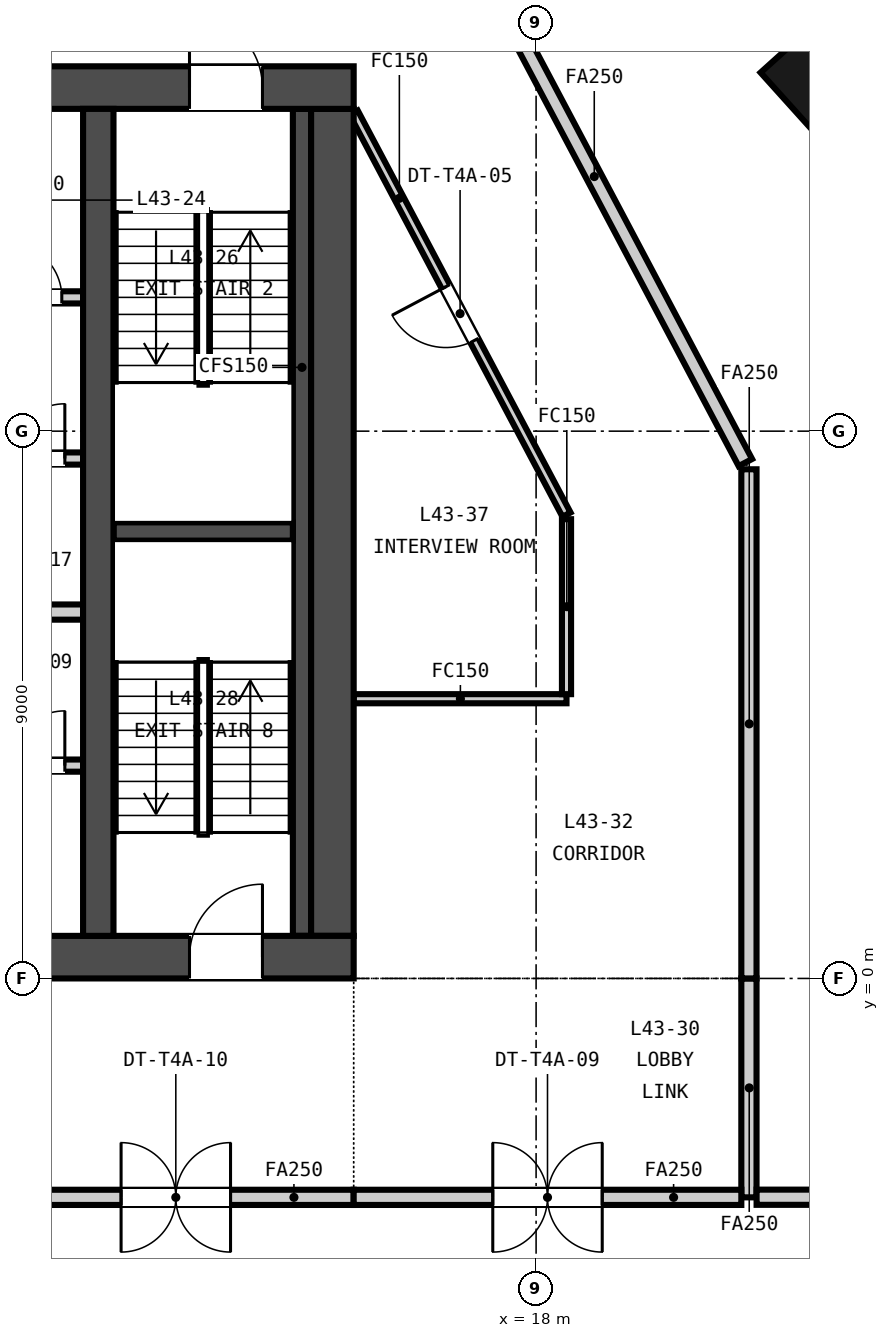
"""IFC4 building model, lengths in metres.
Left out: names, types, materials, properties, quantities, classifications, styles, units other than length and angle.
Written with IfcOpenShell. Run it as: python <this file> out.ifc"""

import sys

from ifc_helpers import new_model, si_unit, direction, frame, frame_2d, origin, origin_2d, place, context, subcontext, project, spatial, rectangle, extrude, element, fill, save


model = new_model("IFC4")
c1 = context("Model", 3, precision=1e-05, world=origin(), true_north=direction((0.0, 1.0)))
c2 = subcontext(c1, "Body", "Model", "MODEL_VIEW")
j1 = project(units=[si_unit("LENGTHUNIT", "METRE"), si_unit("PLANEANGLEUNIT", "RADIAN")], contexts=[c1])
p1 = place(None, origin())
s1 = spatial("IfcSite", under=j1, at=p1, CompositionType="ELEMENT")
p2 = place(p1, origin())
s2 = spatial("IfcBuilding", under=s1, at=p2, CompositionType="ELEMENT")
p3 = place(p2, frame((0.0, 0.0, 174.45)))
s3 = spatial("IfcBuildingStorey", under=s2, at=p3, CompositionType="ELEMENT", Elevation=174.45)
p4 = place(p3, frame((-15.0, 0.35, -0.15), z_axis=(0.0, 0.0, 1.0), x_axis=(1.0, 0.0, 0.0)))
e1 = element("IfcWall", 1, at=p4, inside=s3, PredefinedType="SOLIDWALL", context=c2, shape_type="SweptSolid", body=[
    extrude(rectangle(XDim=30.0, YDim=0.7, at=frame_2d((15.0, 0.0))), origin(), (0.0, 0.0, 1.0), 3.65),
])
p5 = place(p4, frame((5.8, 0.0, 0.15)))
e2 = element("IfcOpeningElement", 2, at=p5, cuts=e1, PredefinedType="OPENING", context=c2, shape_type="SweptSolid", body=[
    extrude(rectangle(XDim=2.4, YDim=2.4, at=frame_2d((1.2, 1.2))), frame((0.0, 0.36, 0.0), z_axis=(0.0, -1.0, 0.0), x_axis=(1.0, 0.0, 0.0)), (0.0, 0.0, 1.0), 0.72),
])
p6 = place(p4, frame((13.8, 0.0, 0.15)))
e3 = element("IfcOpeningElement", 3, at=p6, cuts=e1, PredefinedType="OPENING", context=c2, shape_type="SweptSolid", body=[
    extrude(rectangle(XDim=2.4, YDim=2.4, at=frame_2d((1.2, 1.2))), frame((0.0, 0.36, 0.0), z_axis=(0.0, -1.0, 0.0), x_axis=(1.0, 0.0, 0.0)), (0.0, 0.0, 1.0), 0.72),
])
p7 = place(p4, frame((21.8, 0.0, 0.15)))
e4 = element("IfcOpeningElement", 4, at=p7, cuts=e1, PredefinedType="OPENING", context=c2, shape_type="SweptSolid", body=[
    extrude(rectangle(XDim=2.4, YDim=2.4, at=frame_2d((1.2, 1.2))), frame((0.0, 0.36, 0.0), z_axis=(0.0, -1.0, 0.0), x_axis=(1.0, 0.0, 0.0)), (0.0, 0.0, 1.0), 0.72),
])
p8 = place(p4, frame((1.5, 0.0, 0.15)))
e5 = element("IfcOpeningElement", 5, at=p8, cuts=e1, PredefinedType="OPENING", context=c2, shape_type="SweptSolid", body=[
    extrude(rectangle(XDim=1.2, YDim=2.1, at=frame_2d((0.6, 1.05))), frame((0.0, 0.36, 0.0), z_axis=(0.0, -1.0, 0.0), x_axis=(1.0, 0.0, 0.0)), (0.0, 0.0, 1.0), 0.72),
])
p9 = place(p4, frame((27.3, 0.0, 0.15)))
e6 = element("IfcOpeningElement", 6, at=p9, cuts=e1, PredefinedType="OPENING", context=c2, shape_type="SweptSolid", body=[
    extrude(rectangle(XDim=1.2, YDim=2.1, at=frame_2d((0.6, 1.05))), frame((0.0, 0.36, 0.0), z_axis=(0.0, -1.0, 0.0), x_axis=(1.0, 0.0, 0.0)), (0.0, 0.0, 1.0), 0.72),
])
p10 = place(p3, frame((-15.0, 14.65, -0.15), z_axis=(0.0, 0.0, 1.0), x_axis=(1.0, 0.0, 0.0)))
e7 = element("IfcWall", 7, at=p10, inside=s3, PredefinedType="SOLIDWALL", context=c2, shape_type="SweptSolid", body=[
    extrude(rectangle(XDim=30.0, YDim=0.7, at=frame_2d((15.0, 0.0))), origin(), (0.0, 0.0, 1.0), 3.65),
])
p11 = place(p10, frame((9.25, 0.0, 0.15)))
e8 = element("IfcOpeningElement", 8, at=p11, cuts=e7, PredefinedType="OPENING", context=c2, shape_type="SweptSolid", body=[
    extrude(rectangle(XDim=1.5, YDim=2.1, at=frame_2d((0.75, 1.05))), frame((0.0, 0.36, 0.0), z_axis=(0.0, -1.0, 0.0), x_axis=(1.0, 0.0, 0.0)), (0.0, 0.0, 1.0), 0.72),
])
p12 = place(p10, frame((19.4, 0.0, 0.15)))
e9 = element("IfcOpeningElement", 9, at=p12, cuts=e7, PredefinedType="OPENING", context=c2, shape_type="SweptSolid", body=[
    extrude(rectangle(XDim=1.5, YDim=2.1, at=frame_2d((0.75, 1.05))), frame((0.0, 0.36, 0.0), z_axis=(0.0, -1.0, 0.0), x_axis=(1.0, 0.0, 0.0)), (0.0, 0.0, 1.0), 0.72),
])
p13 = place(p10, frame((1.5, 0.0, 0.15)))
e10 = element("IfcOpeningElement", 10, at=p13, cuts=e7, PredefinedType="OPENING", context=c2, shape_type="SweptSolid", body=[
    extrude(rectangle(XDim=1.2, YDim=2.1, at=frame_2d((0.6, 1.05))), frame((0.0, 0.36, 0.0), z_axis=(0.0, -1.0, 0.0), x_axis=(1.0, 0.0, 0.0)), (0.0, 0.0, 1.0), 0.72),
])
p14 = place(p10, frame((27.3, 0.0, 0.15)))
e11 = element("IfcOpeningElement", 11, at=p14, cuts=e7, PredefinedType="OPENING", context=c2, shape_type="SweptSolid", body=[
    extrude(rectangle(XDim=1.2, YDim=2.1, at=frame_2d((0.6, 1.05))), frame((0.0, 0.36, 0.0), z_axis=(0.0, -1.0, 0.0), x_axis=(1.0, 0.0, 0.0)), (0.0, 0.0, 1.0), 0.72),
])
p15 = place(p3, frame((14.65, 0.7, -0.15), z_axis=(0.0, 0.0, 1.0), x_axis=(0.0, 1.0, 0.0)))
e12 = element("IfcWall", 12, at=p15, inside=s3, PredefinedType="SOLIDWALL", context=c2, shape_type="SweptSolid", body=[
    extrude(rectangle(XDim=13.6, YDim=0.7, at=frame_2d((6.8, 0.0))), origin(), (0.0, 0.0, 1.0), 3.65),
])
p16 = place(p3, frame((10.8, 0.7, -0.15), z_axis=(0.0, 0.0, 1.0), x_axis=(0.0, 1.0, 0.0)))
e13 = element("IfcWall", 13, at=p16, inside=s3, PredefinedType="SOLIDWALL", context=c2, shape_type="SweptSolid", body=[
    extrude(rectangle(XDim=13.6, YDim=0.5, at=frame_2d((6.8, 0.0))), origin(), (0.0, 0.0, 1.0), 3.65),
])
p17 = place(p3, frame((22.61, 14.849, -0.15), z_axis=(0.0, 0.0, 1.0), x_axis=(-0.669130606359, 0.743144825477, 0.0)))
e14 = element("IfcColumn", 14, at=p17, inside=s3, PredefinedType="COLUMN", context=c2, shape_type="SweptSolid", body=[
    extrude(rectangle(XDim=1.3, YDim=1.3, at=origin_2d()), origin(), (0.0, 0.0, 1.0), 3.65),
])
p18 = place(p3, frame((-10.55, 3.5, 0.0), z_axis=(0.0, 0.0, 1.0), x_axis=(1.0, 0.0, 0.0)))
e15 = element("IfcWall", 15, at=p18, inside=s3, PredefinedType="PARTITIONING", context=c2, shape_type="SweptSolid", body=[
    extrude(rectangle(XDim=21.1, YDim=0.2, at=frame_2d((10.55, 0.0))), origin(), (0.0, 0.0, 1.0), 3.5),
])
p19 = place(p18, frame((1.113, 0.0, 0.0)))
e16 = element("IfcOpeningElement", 16, at=p19, cuts=e15, PredefinedType="OPENING", context=c2, shape_type="SweptSolid", body=[
    extrude(rectangle(XDim=1.0, YDim=2.1, at=frame_2d((0.5, 1.05))), frame((0.0, 0.11, 0.0), z_axis=(0.0, -1.0, 0.0), x_axis=(1.0, 0.0, 0.0)), (0.0, 0.0, 1.0), 0.22),
])
p20 = place(p18, frame((5.15, 0.0, 0.0)))
e17 = element("IfcOpeningElement", 17, at=p20, cuts=e15, PredefinedType="OPENING", context=c2, shape_type="SweptSolid", body=[
    extrude(rectangle(XDim=1.0, YDim=2.1, at=frame_2d((0.5, 1.05))), frame((0.0, 0.11, 0.0), z_axis=(0.0, -1.0, 0.0), x_axis=(1.0, 0.0, 0.0)), (0.0, 0.0, 1.0), 0.22),
])
p21 = place(p18, frame((9.85, 0.0, 0.0)))
e18 = element("IfcOpeningElement", 18, at=p21, cuts=e15, PredefinedType="OPENING", context=c2, shape_type="SweptSolid", body=[
    extrude(rectangle(XDim=1.0, YDim=2.1, at=frame_2d((0.5, 1.05))), frame((0.0, 0.11, 0.0), z_axis=(0.0, -1.0, 0.0), x_axis=(1.0, 0.0, 0.0)), (0.0, 0.0, 1.0), 0.22),
])
p22 = place(p18, frame((13.4, 0.0, 0.0)))
e19 = element("IfcOpeningElement", 19, at=p22, cuts=e15, PredefinedType="OPENING", context=c2, shape_type="SweptSolid", body=[
    extrude(rectangle(XDim=1.0, YDim=2.1, at=frame_2d((0.5, 1.05))), frame((0.0, 0.11, 0.0), z_axis=(0.0, -1.0, 0.0), x_axis=(1.0, 0.0, 0.0)), (0.0, 0.0, 1.0), 0.22),
])
p23 = place(p18, frame((16.762, 0.0, 0.0)))
e20 = element("IfcOpeningElement", 20, at=p23, cuts=e15, PredefinedType="OPENING", context=c2, shape_type="SweptSolid", body=[
    extrude(rectangle(XDim=1.0, YDim=2.1, at=frame_2d((0.5, 1.05))), frame((0.0, 0.11, 0.0), z_axis=(0.0, -1.0, 0.0), x_axis=(1.0, 0.0, 0.0)), (0.0, 0.0, 1.0), 0.22),
])
p24 = place(p18, frame((19.9, 0.0, 0.0)))
e21 = element("IfcOpeningElement", 21, at=p24, cuts=e15, PredefinedType="OPENING", context=c2, shape_type="SweptSolid", body=[
    extrude(rectangle(XDim=0.9, YDim=2.1, at=frame_2d((0.45, 1.05))), frame((0.0, 0.11, 0.0), z_axis=(0.0, -1.0, 0.0), x_axis=(1.0, 0.0, 0.0)), (0.0, 0.0, 1.0), 0.22),
])
p25 = place(p3, frame((-10.55, 6.025, 0.0), z_axis=(0.0, 0.0, 1.0), x_axis=(1.0, 0.0, 0.0)))
e22 = element("IfcWall", 22, at=p25, inside=s3, PredefinedType="PARTITIONING", context=c2, shape_type="SweptSolid", body=[
    extrude(rectangle(XDim=21.1, YDim=0.25, at=frame_2d((10.55, 0.0))), origin(), (0.0, 0.0, 1.0), 3.5),
])
p26 = place(p3, frame((-10.55, 8.55, 0.0), z_axis=(0.0, 0.0, 1.0), x_axis=(1.0, 0.0, 0.0)))
e23 = element("IfcWall", 23, at=p26, inside=s3, PredefinedType="PARTITIONING", context=c2, shape_type="SweptSolid", body=[
    extrude(rectangle(XDim=21.1, YDim=0.2, at=frame_2d((10.55, 0.0))), origin(), (0.0, 0.0, 1.0), 3.5),
])
p27 = place(p26, frame((0.675, 0.0, 0.0)))
e24 = element("IfcOpeningElement", 24, at=p27, cuts=e23, PredefinedType="OPENING", context=c2, shape_type="SweptSolid", body=[
    extrude(rectangle(XDim=1.2, YDim=2.1, at=frame_2d((0.6, 1.05))), frame((0.0, 0.11, 0.0), z_axis=(0.0, -1.0, 0.0), x_axis=(1.0, 0.0, 0.0)), (0.0, 0.0, 1.0), 0.22),
])
p28 = place(p26, frame((3.475, 0.0, 0.0)))
e25 = element("IfcOpeningElement", 25, at=p28, cuts=e23, PredefinedType="OPENING", context=c2, shape_type="SweptSolid", body=[
    extrude(rectangle(XDim=1.2, YDim=2.1, at=frame_2d((0.6, 1.05))), frame((0.0, 0.11, 0.0), z_axis=(0.0, -1.0, 0.0), x_axis=(1.0, 0.0, 0.0)), (0.0, 0.0, 1.0), 0.22),
])
p29 = place(p26, frame((6.275, 0.0, 0.0)))
e26 = element("IfcOpeningElement", 26, at=p29, cuts=e23, PredefinedType="OPENING", context=c2, shape_type="SweptSolid", body=[
    extrude(rectangle(XDim=1.2, YDim=2.1, at=frame_2d((0.6, 1.05))), frame((0.0, 0.11, 0.0), z_axis=(0.0, -1.0, 0.0), x_axis=(1.0, 0.0, 0.0)), (0.0, 0.0, 1.0), 0.22),
])
p30 = place(p26, frame((9.075, 0.0, 0.0)))
e27 = element("IfcOpeningElement", 27, at=p30, cuts=e23, PredefinedType="OPENING", context=c2, shape_type="SweptSolid", body=[
    extrude(rectangle(XDim=1.2, YDim=2.1, at=frame_2d((0.6, 1.05))), frame((0.0, 0.11, 0.0), z_axis=(0.0, -1.0, 0.0), x_axis=(1.0, 0.0, 0.0)), (0.0, 0.0, 1.0), 0.22),
])
p31 = place(p26, frame((11.875, 0.0, 0.0)))
e28 = element("IfcOpeningElement", 28, at=p31, cuts=e23, PredefinedType="OPENING", context=c2, shape_type="SweptSolid", body=[
    extrude(rectangle(XDim=1.2, YDim=2.1, at=frame_2d((0.6, 1.05))), frame((0.0, 0.11, 0.0), z_axis=(0.0, -1.0, 0.0), x_axis=(1.0, 0.0, 0.0)), (0.0, 0.0, 1.0), 0.22),
])
p32 = place(p26, frame((14.675, 0.0, 0.0)))
e29 = element("IfcOpeningElement", 29, at=p32, cuts=e23, PredefinedType="OPENING", context=c2, shape_type="SweptSolid", body=[
    extrude(rectangle(XDim=1.2, YDim=2.1, at=frame_2d((0.6, 1.05))), frame((0.0, 0.11, 0.0), z_axis=(0.0, -1.0, 0.0), x_axis=(1.0, 0.0, 0.0)), (0.0, 0.0, 1.0), 0.22),
])
p33 = place(p26, frame((17.475, 0.0, 0.0)))
e30 = element("IfcOpeningElement", 30, at=p33, cuts=e23, PredefinedType="OPENING", context=c2, shape_type="SweptSolid", body=[
    extrude(rectangle(XDim=1.2, YDim=2.1, at=frame_2d((0.6, 1.05))), frame((0.0, 0.11, 0.0), z_axis=(0.0, -1.0, 0.0), x_axis=(1.0, 0.0, 0.0)), (0.0, 0.0, 1.0), 0.22),
])
p34 = place(p26, frame((19.9, 0.0, 0.0)))
e31 = element("IfcOpeningElement", 31, at=p34, cuts=e23, PredefinedType="OPENING", context=c2, shape_type="SweptSolid", body=[
    extrude(rectangle(XDim=0.9, YDim=2.1, at=frame_2d((0.45, 1.05))), frame((0.0, 0.11, 0.0), z_axis=(0.0, -1.0, 0.0), x_axis=(1.0, 0.0, 0.0)), (0.0, 0.0, 1.0), 0.22),
])
p35 = place(p3, frame((5.9, 11.2, 0.0), z_axis=(0.0, 0.0, 1.0), x_axis=(1.0, 0.0, 0.0)))
e32 = element("IfcWall", 32, at=p35, inside=s3, PredefinedType="PARTITIONING", context=c2, shape_type="SweptSolid", body=[
    extrude(rectangle(XDim=4.65, YDim=0.2, at=frame_2d((2.325, 0.0))), origin(), (0.0, 0.0, 1.0), 3.5),
])
p36 = place(p35, frame((3.4, 0.0, 0.0)))
e33 = element("IfcOpeningElement", 33, at=p36, cuts=e32, PredefinedType="OPENING", context=c2, shape_type="SweptSolid", body=[
    extrude(rectangle(XDim=0.9, YDim=2.1, at=frame_2d((0.45, 1.05))), frame((0.0, 0.11, 0.0), z_axis=(0.0, -1.0, 0.0), x_axis=(1.0, 0.0, 0.0)), (0.0, 0.0, 1.0), 0.22),
])
p37 = place(p3, frame((11.05, 7.35, 0.0), z_axis=(0.0, 0.0, 1.0), x_axis=(1.0, 0.0, 0.0)))
e34 = element("IfcWall", 34, at=p37, inside=s3, PredefinedType="SOLIDWALL", context=c2, shape_type="SweptSolid", body=[
    extrude(rectangle(XDim=2.95, YDim=0.3, at=frame_2d((1.475, 0.0))), origin(), (0.0, 0.0, 1.0), 3.5),
])
p38 = place(p3, frame((14.15, 0.7, 0.0), z_axis=(0.0, 0.0, 1.0), x_axis=(0.0, 1.0, 0.0)))
e35 = element("IfcWall", 35, at=p38, inside=s3, PredefinedType="SOLIDWALL", context=c2, shape_type="SweptSolid", body=[
    extrude(rectangle(XDim=13.6, YDim=0.3, at=frame_2d((6.8, 0.0))), origin(), (0.0, 0.0, 1.0), 3.5),
])
p39 = place(p3, frame((15.0, -3.6, 0.0), z_axis=(0.0, 0.0, 1.0), x_axis=(-1.0, 0.0, 0.0)))
e36 = element("IfcWall", 36, at=p39, inside=s3, PredefinedType="PARTITIONING", context=c2, shape_type="SweptSolid", body=[
    extrude(rectangle(XDim=5.85, YDim=0.25, at=frame_2d((2.925, 0.0))), origin(), (0.0, 0.0, 1.0), 2.741),
])
p40 = place(p39, frame((2.025, 0.0, 0.0)))
e37 = element("IfcOpeningElement", 37, at=p40, cuts=e36, PredefinedType="OPENING", context=c2, shape_type="SweptSolid", body=[
    extrude(rectangle(XDim=1.8, YDim=2.1, at=frame_2d((0.9, 1.05))), frame((0.0, 0.135, 0.0), z_axis=(0.0, -1.0, 0.0), x_axis=(1.0, 0.0, 0.0)), (0.0, 0.0, 1.0), 0.27),
])
p41 = place(p3, frame((21.5, 0.0, 0.0), z_axis=(0.0, 0.0, 1.0), x_axis=(0.0, -1.0, 0.0)))
e38 = element("IfcWall", 38, at=p41, inside=s3, PredefinedType="PARTITIONING", context=c2, shape_type="SweptSolid", body=[
    extrude(rectangle(XDim=3.6, YDim=0.25, at=frame_2d((1.8, 0.0))), origin(), (0.0, 0.0, 1.0), 2.741),
])
p42 = place(p3, frame((21.375, -3.6, 0.0), z_axis=(0.0, 0.0, 1.0), x_axis=(-1.0, 0.0, 0.0)))
e39 = element("IfcWall", 39, at=p42, inside=s3, PredefinedType="PARTITIONING", context=c2, shape_type="SweptSolid", body=[
    extrude(rectangle(XDim=6.375, YDim=0.25, at=frame_2d((3.188, 0.0))), origin(), (0.0, 0.0, 1.0), 2.741),
])
p43 = place(p42, frame((2.288, 0.0, 0.0)))
e40 = element("IfcOpeningElement", 40, at=p43, cuts=e39, PredefinedType="OPENING", context=c2, shape_type="SweptSolid", body=[
    extrude(rectangle(XDim=1.8, YDim=2.1, at=frame_2d((0.9, 1.05))), frame((0.0, 0.135, 0.0), z_axis=(0.0, -1.0, 0.0), x_axis=(1.0, 0.0, 0.0)), (0.0, 0.0, 1.0), 0.27),
])
p44 = place(p3, frame((18.5, 7.627, 0.0), z_axis=(0.0, 0.0, 1.0), x_axis=(-0.467835241243, 0.883815697446, 0.0)))
e41 = element("IfcWall", 41, at=p44, inside=s3, PredefinedType="PARTITIONING", context=c2, shape_type="SweptSolid", body=[
    extrude(rectangle(XDim=7.481, YDim=0.15, at=frame_2d((3.741, 0.0))), origin(), (0.0, 0.0, 1.0), 2.741),
])
p45 = place(p44, frame((3.24, 0.0, 0.0)))
e42 = element("IfcOpeningElement", 42, at=p45, cuts=e41, PredefinedType="OPENING", context=c2, shape_type="SweptSolid", body=[
    extrude(rectangle(XDim=1.0, YDim=2.1, at=frame_2d((0.5, 1.05))), frame((0.0, 0.085, 0.0), z_axis=(0.0, -1.0, 0.0), x_axis=(1.0, 0.0, 0.0)), (0.0, 0.0, 1.0), 0.17),
])
p46 = place(p3, frame((21.5, 8.373, 0.0), z_axis=(0.0, 0.0, 1.0), x_axis=(0.0, -1.0, 0.0)))
e43 = element("IfcWall", 43, at=p46, inside=s3, PredefinedType="PARTITIONING", context=c2, shape_type="SweptSolid", body=[
    extrude(rectangle(XDim=8.373, YDim=0.25, at=frame_2d((4.187, 0.0))), origin(), (0.0, 0.0, 1.0), 2.741),
])
p47 = place(p3, frame((15.0, 4.6, 0.0), z_axis=(0.0, 0.0, 1.0), x_axis=(1.0, 0.0, 0.0)))
e44 = element("IfcWall", 44, at=p47, inside=s3, PredefinedType="PARTITIONING", context=c2, shape_type="SweptSolid", body=[
    extrude(rectangle(XDim=3.5, YDim=0.15, at=frame_2d((1.75, 0.0))), origin(), (0.0, 0.0, 1.0), 2.741),
])
p48 = place(p3, frame((18.5, 4.675, 0.0), z_axis=(0.0, 0.0, 1.0), x_axis=(0.0, 1.0, 0.0)))
e45 = element("IfcWall", 45, at=p48, inside=s3, PredefinedType="PARTITIONING", context=c2, shape_type="SweptSolid", body=[
    extrude(rectangle(XDim=2.877, YDim=0.15, at=frame_2d((1.438, 0.0))), origin(), (0.0, 0.0, 1.0), 2.741),
])
p49 = place(p3, frame((16.461, 17.889, 0.0), z_axis=(0.0, 0.0, 1.0), x_axis=(0.467911961302, -0.883775082513, 0.0)))
e46 = element("IfcWall", 46, at=p49, inside=s3, PredefinedType="PARTITIONING", context=c2, shape_type="SweptSolid", body=[
    extrude(rectangle(XDim=10.643, YDim=0.25, at=frame_2d((5.322, 0.0))), origin(), (0.0, 0.0, 1.0), 2.741),
])
p50 = place(p3, frame((21.626, -3.598, 0.0), z_axis=(0.0, 0.0, 1.0), x_axis=(1.0, 0.0, 0.0)))
e47 = element("IfcWall", 47, at=p50, inside=s3, PredefinedType="PARTITIONING", context=c2, shape_type="SweptSolid", body=[
    extrude(rectangle(XDim=7.725, YDim=0.25, at=frame_2d((3.863, 0.0))), origin(), (0.0, 0.0, 1.0), 2.741),
])
p51 = place(p24, origin())
e48 = element("IfcDoor", 48, at=p51, inside=s3, OperationType="SINGLE_SWING_RIGHT", PredefinedType="DOOR", context=c2, shape_type="SweptSolid", body=[
    extrude(rectangle(XDim=0.9, YDim=2.1, at=frame_2d((0.45, 1.05))), frame((0.0, 0.025, 0.0), z_axis=(0.0, -1.0, 0.0), x_axis=(1.0, 0.0, 0.0)), (0.0, 0.0, 1.0), 0.05),
])
fill(e21, e48)
p52 = place(p34, origin())
e49 = element("IfcDoor", 49, at=p52, inside=s3, OperationType="SINGLE_SWING_RIGHT", PredefinedType="DOOR", context=c2, shape_type="SweptSolid", body=[
    extrude(rectangle(XDim=0.9, YDim=2.1, at=frame_2d((0.45, 1.05))), frame((0.0, 0.025, 0.0), z_axis=(0.0, -1.0, 0.0), x_axis=(1.0, 0.0, 0.0)), (0.0, 0.0, 1.0), 0.05),
])
fill(e31, e49)
p53 = place(p36, origin())
e50 = element("IfcDoor", 50, at=p53, inside=s3, OperationType="SINGLE_SWING_LEFT", PredefinedType="DOOR", context=c2, shape_type="SweptSolid", body=[
    extrude(rectangle(XDim=0.9, YDim=2.1, at=frame_2d((0.45, 1.05))), frame((0.0, 0.025, 0.0), z_axis=(0.0, -1.0, 0.0), x_axis=(1.0, 0.0, 0.0)), (0.0, 0.0, 1.0), 0.05),
])
fill(e33, e50)
p54 = place(p14, origin())
e51 = element("IfcDoor", 51, at=p54, inside=s3, OperationType="SINGLE_SWING_LEFT", PredefinedType="DOOR", context=c2, shape_type="SweptSolid", body=[
    extrude(rectangle(XDim=1.2, YDim=2.1, at=frame_2d((0.6, 1.05))), frame((0.0, 0.025, 0.0), z_axis=(0.0, -1.0, 0.0), x_axis=(1.0, 0.0, 0.0)), (0.0, 0.0, 1.0), 0.05),
])
fill(e11, e51)
p55 = place(p9, origin())
e52 = element("IfcDoor", 52, at=p55, inside=s3, OperationType="SINGLE_SWING_RIGHT", PredefinedType="DOOR", context=c2, shape_type="SweptSolid", body=[
    extrude(rectangle(XDim=1.2, YDim=2.1, at=frame_2d((0.6, 1.05))), frame((0.0, 0.025, 0.0), z_axis=(0.0, -1.0, 0.0), x_axis=(1.0, 0.0, 0.0)), (0.0, 0.0, 1.0), 0.05),
])
fill(e6, e52)
p56 = place(p45, origin())
e53 = element("IfcDoor", 53, at=p56, inside=s3, OperationType="SINGLE_SWING_RIGHT", PredefinedType="DOOR", context=c2, shape_type="SweptSolid", body=[
    extrude(rectangle(XDim=1.0, YDim=2.1, at=frame_2d((0.5, 1.05))), frame((0.0, 0.025, 0.0), z_axis=(0.0, -1.0, 0.0), x_axis=(1.0, 0.0, 0.0)), (0.0, 0.0, 1.0), 0.05),
])
fill(e42, e53)
p57 = place(p43, origin())
e54 = element("IfcDoor", 54, at=p57, inside=s3, OperationType="DOUBLE_DOOR_DOUBLE_SWING", PredefinedType="DOOR", context=c2, shape_type="SweptSolid", body=[
    extrude(rectangle(XDim=1.8, YDim=2.1, at=frame_2d((0.9, 1.05))), frame((0.0, 0.025, 0.0), z_axis=(0.0, -1.0, 0.0), x_axis=(1.0, 0.0, 0.0)), (0.0, 0.0, 1.0), 0.05),
])
fill(e40, e54)
p58 = place(p40, origin())
e55 = element("IfcDoor", 55, at=p58, inside=s3, OperationType="DOUBLE_DOOR_DOUBLE_SWING", PredefinedType="DOOR", context=c2, shape_type="SweptSolid", body=[
    extrude(rectangle(XDim=1.8, YDim=2.1, at=frame_2d((0.9, 1.05))), frame((0.0, 0.025, 0.0), z_axis=(0.0, -1.0, 0.0), x_axis=(1.0, 0.0, 0.0)), (0.0, 0.0, 1.0), 0.05),
])
fill(e37, e55)
save(model, sys.argv[1])
